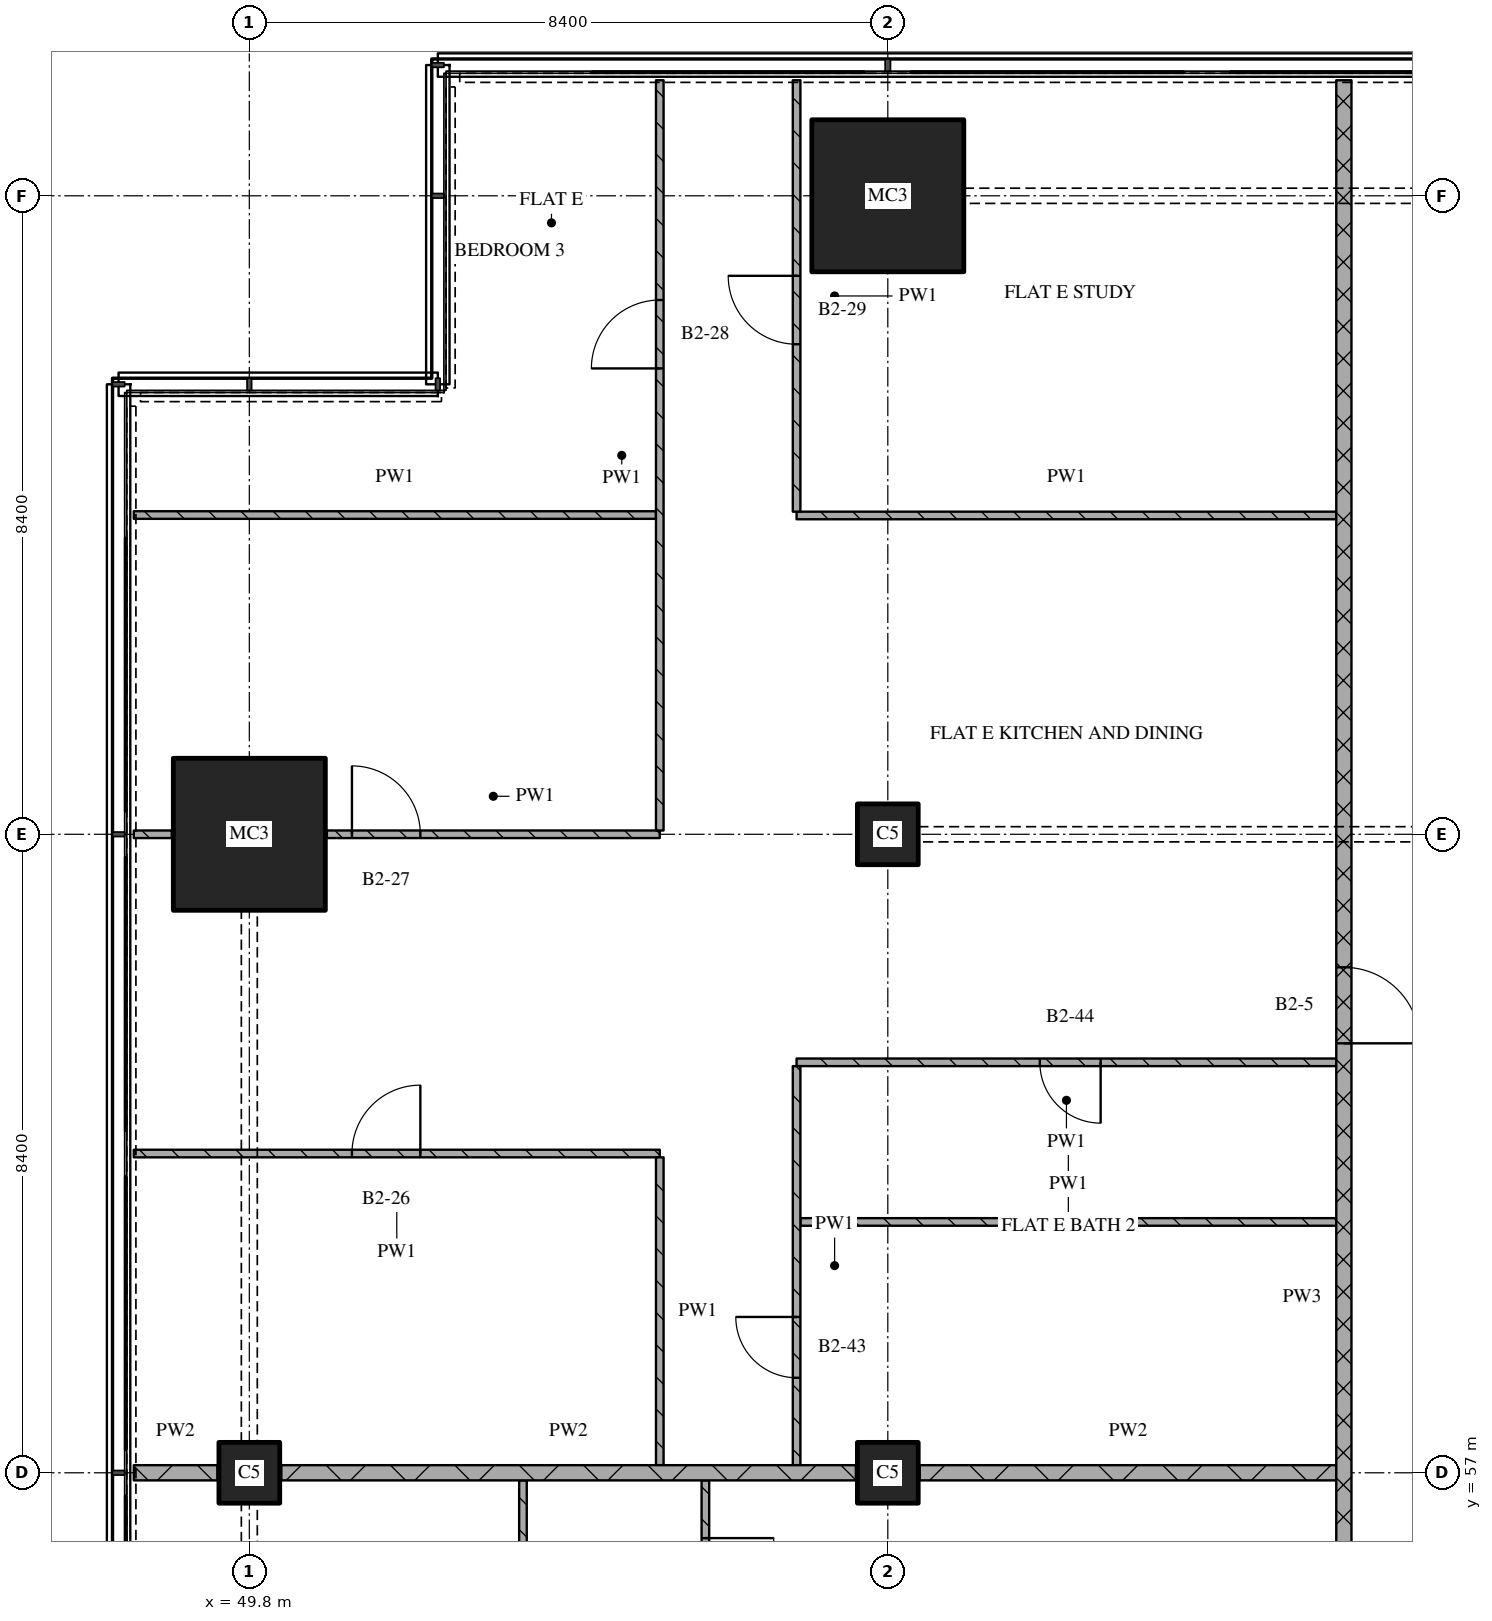
"""IFC4 building model, lengths in metres.
Left out: names, types, materials, properties, quantities, classifications, styles, units other than length and angle.
Written with IfcOpenShell. Run it as: python <this file> out.ifc"""

import sys

from ifc_helpers import new_model, si_unit, direction, frame, frame_2d, origin, origin_2d, place, context, subcontext, project, spatial, rectangle, extrude, element, fill, save


model = new_model("IFC4")
c1 = context("Model", 3, precision=1e-05, world=origin(), true_north=direction((0.0, 1.0)))
c2 = subcontext(c1, "Body", "Model", "MODEL_VIEW")
j1 = project(units=[si_unit("LENGTHUNIT", "METRE"), si_unit("PLANEANGLEUNIT", "RADIAN")], contexts=[c1])
p1 = place(None, origin())
s1 = spatial("IfcSite", under=j1, at=p1, CompositionType="ELEMENT")
p2 = place(p1, origin())
s2 = spatial("IfcBuilding", under=s1, at=p2, CompositionType="ELEMENT")
p3 = place(p2, frame((0.0, 0.0, 109.65)))
s3 = spatial("IfcBuildingStorey", under=s2, at=p3, CompositionType="ELEMENT", Elevation=109.65)
p4 = place(p3, frame((49.8, 57.0, 0.0), z_axis=(0.0, 0.0, 1.0), x_axis=(1.0, 0.0, 0.0)))
e1 = element("IfcColumn", 1, at=p4, inside=s3, PredefinedType="COLUMN", context=c2, shape_type="SweptSolid", body=[
    extrude(rectangle(XDim=0.8, YDim=0.8, at=origin_2d()), origin(), (0.0, 0.0, 1.0), 3.6),
])
p5 = place(p3, frame((49.8, 65.4, 0.0), z_axis=(0.0, 0.0, 1.0), x_axis=(1.0, 0.0, 0.0)))
e2 = element("IfcColumn", 2, at=p5, inside=s3, PredefinedType="COLUMN", context=c2, shape_type="SweptSolid", body=[
    extrude(rectangle(XDim=2.0, YDim=2.0, at=origin_2d()), origin(), (0.0, 0.0, 1.0), 3.6),
])
for number, where, z_axis, x_axis in (
    (3, (58.2, 57.0, 0.0), (0.0, 0.0, 1.0), (1.0, 0.0, 0.0)),
    (4, (58.2, 65.4, 0.0), (0.0, 0.0, 1.0), (1.0, 0.0, 0.0)),
):
    element("IfcColumn", number, at=place(p3, frame(where, z_axis=z_axis, x_axis=x_axis)), inside=s3, PredefinedType="COLUMN", context=c2, shape_type="SweptSolid", body=[
        extrude(rectangle(XDim=0.8, YDim=0.8, at=origin_2d()), origin(), (0.0, 0.0, 1.0), 3.6),
    ])
p6 = place(p3, frame((58.2, 73.8, 0.0), z_axis=(0.0, 0.0, 1.0), x_axis=(1.0, 0.0, 0.0)))
e5 = element("IfcColumn", 5, at=p6, inside=s3, PredefinedType="COLUMN", context=c2, shape_type="SweptSolid", body=[
    extrude(rectangle(XDim=2.0, YDim=2.0, at=origin_2d()), origin(), (0.0, 0.0, 1.0), 3.6),
])
p7 = place(p3, frame((48.28, 57.0, 0.0), z_axis=(0.0, 0.0, 1.0), x_axis=(1.0, 0.0, 0.0)))
e6 = element("IfcWall", 6, at=p7, inside=s3, PredefinedType="PARTITIONING", context=c2, shape_type="SweptSolid", body=[
    extrude(rectangle(XDim=1.1, YDim=0.2, at=frame_2d((0.55, 0.0))), origin(), (0.0, 0.0, 1.0), 3.32),
])
p8 = place(p3, frame((50.22, 57.0, 0.0), z_axis=(0.0, 0.0, 1.0), x_axis=(1.0, 0.0, 0.0)))
e7 = element("IfcWall", 7, at=p8, inside=s3, PredefinedType="PARTITIONING", context=c2, shape_type="SweptSolid", body=[
    extrude(rectangle(XDim=7.56, YDim=0.2, at=frame_2d((3.78, 0.0))), origin(), (0.0, 0.0, 1.0), 3.32),
])
p9 = place(p3, frame((58.62, 57.0, 0.0), z_axis=(0.0, 0.0, 1.0), x_axis=(1.0, 0.0, 0.0)))
e8 = element("IfcWall", 8, at=p9, inside=s3, PredefinedType="PARTITIONING", context=c2, shape_type="SweptSolid", body=[
    extrude(rectangle(XDim=5.48, YDim=0.2, at=frame_2d((2.74, 0.0))), origin(), (0.0, 0.0, 1.0), 3.32),
])
p10 = place(p3, frame((57.05, 60.3, 0.0), z_axis=(0.0, 0.0, 1.0), x_axis=(1.0, 0.0, 0.0)))
e9 = element("IfcWall", 9, at=p10, inside=s3, PredefinedType="PARTITIONING", context=c2, shape_type="SweptSolid", body=[
    extrude(rectangle(XDim=7.05, YDim=0.1, at=frame_2d((3.525, 0.0))), origin(), (0.0, 0.0, 1.0), 3.32),
])
p11 = place(p3, frame((55.2, 61.2, 0.0), z_axis=(0.0, 0.0, 1.0), x_axis=(-1.0, 0.0, 0.0)))
e10 = element("IfcWall", 10, at=p11, inside=s3, PredefinedType="PARTITIONING", context=c2, shape_type="SweptSolid", body=[
    extrude(rectangle(XDim=6.92, YDim=0.1, at=frame_2d((3.46, 0.0))), origin(), (0.0, 0.0, 1.0), 3.32),
])
p12 = place(p11, frame((3.15, 0.0, 0.0)))
e11 = element("IfcOpeningElement", 11, at=p12, cuts=e10, PredefinedType="OPENING", context=c2, shape_type="SweptSolid", body=[
    extrude(rectangle(XDim=0.9, YDim=2.1, at=frame_2d((0.45, 1.05))), frame((0.0, 0.06, 0.0), z_axis=(0.0, -1.0, 0.0), x_axis=(1.0, 0.0, 0.0)), (0.0, 0.0, 1.0), 0.12),
])
p13 = place(p3, frame((64.1, 62.4, 0.0), z_axis=(0.0, 0.0, 1.0), x_axis=(-1.0, 0.0, 0.0)))
e12 = element("IfcWall", 12, at=p13, inside=s3, PredefinedType="PARTITIONING", context=c2, shape_type="SweptSolid", body=[
    extrude(rectangle(XDim=7.1, YDim=0.1, at=frame_2d((3.55, 0.0))), origin(), (0.0, 0.0, 1.0), 3.32),
])
p14 = place(p13, frame((3.1, 0.0, 0.0)))
e13 = element("IfcOpeningElement", 13, at=p14, cuts=e12, PredefinedType="OPENING", context=c2, shape_type="SweptSolid", body=[
    extrude(rectangle(XDim=0.8, YDim=2.1, at=frame_2d((0.4, 1.05))), frame((0.0, 0.06, 0.0), z_axis=(0.0, -1.0, 0.0), x_axis=(1.0, 0.0, 0.0)), (0.0, 0.0, 1.0), 0.12),
])
p15 = place(p3, frame((48.28, 65.4, 0.0), z_axis=(0.0, 0.0, 1.0), x_axis=(1.0, 0.0, 0.0)))
e14 = element("IfcWall", 14, at=p15, inside=s3, PredefinedType="PARTITIONING", context=c2, shape_type="SweptSolid", body=[
    extrude(rectangle(XDim=0.5, YDim=0.1, at=frame_2d((0.25, 0.0))), origin(), (0.0, 0.0, 1.0), 3.32),
])
p16 = place(p3, frame((50.82, 65.4, 0.0), z_axis=(0.0, 0.0, 1.0), x_axis=(1.0, 0.0, 0.0)))
e15 = element("IfcWall", 15, at=p16, inside=s3, PredefinedType="PARTITIONING", context=c2, shape_type="SweptSolid", body=[
    extrude(rectangle(XDim=4.38, YDim=0.1, at=frame_2d((2.19, 0.0))), origin(), (0.0, 0.0, 1.0), 3.32),
])
p17 = place(p16, frame((0.33, 0.0, 0.0)))
e16 = element("IfcOpeningElement", 16, at=p17, cuts=e15, PredefinedType="OPENING", context=c2, shape_type="SweptSolid", body=[
    extrude(rectangle(XDim=0.9, YDim=2.1, at=frame_2d((0.45, 1.05))), frame((0.0, 0.06, 0.0), z_axis=(0.0, -1.0, 0.0), x_axis=(1.0, 0.0, 0.0)), (0.0, 0.0, 1.0), 0.12),
])
p18 = place(p3, frame((57.0, 69.594, 0.0), z_axis=(0.0, 0.0, 1.0), x_axis=(1.0, 0.0, 0.0)))
e17 = element("IfcWall", 17, at=p18, inside=s3, PredefinedType="PARTITIONING", context=c2, shape_type="SweptSolid", body=[
    extrude(rectangle(XDim=7.1, YDim=0.1, at=frame_2d((3.55, 0.0))), origin(), (0.0, 0.0, 1.0), 3.32),
])
p19 = place(p3, frame((48.28, 69.6, 0.0), z_axis=(0.0, 0.0, 1.0), x_axis=(1.0, 0.0, 0.0)))
e18 = element("IfcWall", 18, at=p19, inside=s3, PredefinedType="PARTITIONING", context=c2, shape_type="SweptSolid", body=[
    extrude(rectangle(XDim=6.87, YDim=0.1, at=frame_2d((3.435, 0.0))), origin(), (0.0, 0.0, 1.0), 3.32),
])
p20 = place(p3, frame((53.4, 56.9, 0.0), z_axis=(0.0, 0.0, 1.0), x_axis=(0.0, -1.0, 0.0)))
e19 = element("IfcWall", 19, at=p20, inside=s3, PredefinedType="PARTITIONING", context=c2, shape_type="SweptSolid", body=[
    extrude(rectangle(XDim=8.25, YDim=0.1, at=frame_2d((4.125, 0.0))), origin(), (0.0, 0.0, 1.0), 3.32),
])
p21 = place(p3, frame((55.2, 61.15, 0.0), z_axis=(0.0, 0.0, 1.0), x_axis=(0.0, -1.0, 0.0)))
e20 = element("IfcWall", 20, at=p21, inside=s3, PredefinedType="PARTITIONING", context=c2, shape_type="SweptSolid", body=[
    extrude(rectangle(XDim=4.05, YDim=0.1, at=frame_2d((2.025, 0.0))), origin(), (0.0, 0.0, 1.0), 3.32),
])
p22 = place(p3, frame((55.2, 65.45, 0.0), z_axis=(0.0, 0.0, 1.0), x_axis=(0.0, 1.0, 0.0)))
e21 = element("IfcWall", 21, at=p22, inside=s3, PredefinedType="PARTITIONING", context=c2, shape_type="SweptSolid", body=[
    extrude(rectangle(XDim=9.87, YDim=0.1, at=frame_2d((4.935, 0.0))), origin(), (0.0, 0.0, 1.0), 3.32),
])
p23 = place(p22, frame((6.079, 0.0, 0.0)))
e22 = element("IfcOpeningElement", 22, at=p23, cuts=e21, PredefinedType="OPENING", context=c2, shape_type="SweptSolid", body=[
    extrude(rectangle(XDim=0.9, YDim=2.1, at=frame_2d((0.45, 1.05))), frame((0.0, 0.06, 0.0), z_axis=(0.0, -1.0, 0.0), x_axis=(1.0, 0.0, 0.0)), (0.0, 0.0, 1.0), 0.12),
])
p24 = place(p3, frame((55.8, 56.9, 0.0), z_axis=(0.0, 0.0, 1.0), x_axis=(0.0, -1.0, 0.0)))
e23 = element("IfcWall", 23, at=p24, inside=s3, PredefinedType="PARTITIONING", context=c2, shape_type="SweptSolid", body=[
    extrude(rectangle(XDim=2.469, YDim=0.1, at=frame_2d((1.234, 0.0))), origin(), (0.0, 0.0, 1.0), 3.32),
])
p25 = place(p24, frame((0.76, 0.0, 0.0)))
e24 = element("IfcOpeningElement", 24, at=p25, cuts=e23, PredefinedType="OPENING", context=c2, shape_type="SweptSolid", body=[
    extrude(rectangle(XDim=0.9, YDim=2.1, at=frame_2d((0.45, 1.05))), frame((0.0, 0.06, 0.0), z_axis=(0.0, -1.0, 0.0), x_axis=(1.0, 0.0, 0.0)), (0.0, 0.0, 1.0), 0.12),
])
p26 = place(p3, frame((57.0, 62.35, 0.0), z_axis=(0.0, 0.0, 1.0), x_axis=(0.0, -1.0, 0.0)))
e25 = element("IfcWall", 25, at=p26, inside=s3, PredefinedType="PARTITIONING", context=c2, shape_type="SweptSolid", body=[
    extrude(rectangle(XDim=5.25, YDim=0.1, at=frame_2d((2.625, 0.0))), origin(), (0.0, 0.0, 1.0), 3.32),
])
p27 = place(p26, frame((3.3, 0.0, 0.0)))
e26 = element("IfcOpeningElement", 26, at=p27, cuts=e25, PredefinedType="OPENING", context=c2, shape_type="SweptSolid", body=[
    extrude(rectangle(XDim=0.8, YDim=2.1, at=frame_2d((0.4, 1.05))), frame((0.0, 0.06, 0.0), z_axis=(0.0, -1.0, 0.0), x_axis=(1.0, 0.0, 0.0)), (0.0, 0.0, 1.0), 0.12),
])
p28 = place(p3, frame((57.0, 75.32, 0.0), z_axis=(0.0, 0.0, 1.0), x_axis=(0.0, -1.0, 0.0)))
e27 = element("IfcWall", 27, at=p28, inside=s3, PredefinedType="PARTITIONING", context=c2, shape_type="SweptSolid", body=[
    extrude(rectangle(XDim=5.676, YDim=0.1, at=frame_2d((2.838, 0.0))), origin(), (0.0, 0.0, 1.0), 3.32),
])
p29 = place(p28, frame((2.573, 0.0, 0.0)))
e28 = element("IfcOpeningElement", 28, at=p29, cuts=e27, PredefinedType="OPENING", context=c2, shape_type="SweptSolid", body=[
    extrude(rectangle(XDim=0.9, YDim=2.1, at=frame_2d((0.45, 1.05))), frame((0.0, 0.06, 0.0), z_axis=(0.0, -1.0, 0.0), x_axis=(1.0, 0.0, 0.0)), (0.0, 0.0, 1.0), 0.12),
])
p30 = place(p3, frame((64.2, 43.3, 0.0), z_axis=(0.0, 0.0, 1.0), x_axis=(0.0, 1.0, 0.0)))
e29 = element("IfcWall", 29, at=p30, inside=s3, PredefinedType="PARTITIONING", context=c2, shape_type="SweptSolid", body=[
    extrude(rectangle(XDim=32.02, YDim=0.2, at=frame_2d((16.01, 0.0))), origin(), (0.0, 0.0, 1.0), 3.32),
])
p31 = place(p30, frame((4.95, 0.0, 0.0)))
e30 = element("IfcOpeningElement", 30, at=p31, cuts=e29, PredefinedType="OPENING", context=c2, shape_type="SweptSolid", body=[
    extrude(rectangle(XDim=1.0, YDim=2.1, at=frame_2d((0.5, 1.05))), frame((0.0, 0.11, 0.0), z_axis=(0.0, -1.0, 0.0), x_axis=(1.0, 0.0, 0.0)), (0.0, 0.0, 1.0), 0.22),
])
p32 = place(p30, frame((19.35, 0.0, 0.0)))
e31 = element("IfcOpeningElement", 31, at=p32, cuts=e29, PredefinedType="OPENING", context=c2, shape_type="SweptSolid", body=[
    extrude(rectangle(XDim=1.0, YDim=2.1, at=frame_2d((0.5, 1.05))), frame((0.0, 0.11, 0.0), z_axis=(0.0, -1.0, 0.0), x_axis=(1.0, 0.0, 0.0)), (0.0, 0.0, 1.0), 0.22),
])
p33 = place(p12, origin())
e32 = element("IfcDoor", 32, at=p33, inside=s3, OperationType="SINGLE_SWING_RIGHT", PredefinedType="DOOR", context=c2, shape_type="SweptSolid", body=[
    extrude(rectangle(XDim=0.9, YDim=2.1, at=frame_2d((0.45, 1.05))), frame((0.0, 0.025, 0.0), z_axis=(0.0, -1.0, 0.0), x_axis=(1.0, 0.0, 0.0)), (0.0, 0.0, 1.0), 0.05),
])
fill(e11, e32)
p34 = place(p14, origin())
e33 = element("IfcDoor", 33, at=p34, inside=s3, OperationType="SINGLE_SWING_LEFT", PredefinedType="DOOR", context=c2, shape_type="SweptSolid", body=[
    extrude(rectangle(XDim=0.8, YDim=2.1, at=frame_2d((0.4, 1.05))), frame((0.0, 0.025, 0.0), z_axis=(0.0, -1.0, 0.0), x_axis=(1.0, 0.0, 0.0)), (0.0, 0.0, 1.0), 0.05),
])
fill(e13, e33)
p35 = place(p17, origin())
e34 = element("IfcDoor", 34, at=p35, inside=s3, OperationType="SINGLE_SWING_LEFT", PredefinedType="DOOR", context=c2, shape_type="SweptSolid", body=[
    extrude(rectangle(XDim=0.9, YDim=2.1, at=frame_2d((0.45, 1.05))), frame((0.0, 0.025, 0.0), z_axis=(0.0, -1.0, 0.0), x_axis=(1.0, 0.0, 0.0)), (0.0, 0.0, 1.0), 0.05),
])
fill(e16, e34)
p36 = place(p23, origin())
e35 = element("IfcDoor", 35, at=p36, inside=s3, OperationType="SINGLE_SWING_LEFT", PredefinedType="DOOR", context=c2, shape_type="SweptSolid", body=[
    extrude(rectangle(XDim=0.9, YDim=2.1, at=frame_2d((0.45, 1.05))), frame((0.0, 0.025, 0.0), z_axis=(0.0, -1.0, 0.0), x_axis=(1.0, 0.0, 0.0)), (0.0, 0.0, 1.0), 0.05),
])
fill(e22, e35)
p37 = place(p25, origin())
e36 = element("IfcDoor", 36, at=p37, inside=s3, OperationType="SINGLE_SWING_LEFT", PredefinedType="DOOR", context=c2, shape_type="SweptSolid", body=[
    extrude(rectangle(XDim=0.9, YDim=2.1, at=frame_2d((0.45, 1.05))), frame((0.0, 0.025, 0.0), z_axis=(0.0, -1.0, 0.0), x_axis=(1.0, 0.0, 0.0)), (0.0, 0.0, 1.0), 0.05),
])
fill(e24, e36)
p38 = place(p27, origin())
e37 = element("IfcDoor", 37, at=p38, inside=s3, OperationType="SINGLE_SWING_RIGHT", PredefinedType="DOOR", context=c2, shape_type="SweptSolid", body=[
    extrude(rectangle(XDim=0.8, YDim=2.1, at=frame_2d((0.4, 1.05))), frame((0.0, 0.025, 0.0), z_axis=(0.0, -1.0, 0.0), x_axis=(1.0, 0.0, 0.0)), (0.0, 0.0, 1.0), 0.05),
])
fill(e26, e37)
p39 = place(p29, origin())
e38 = element("IfcDoor", 38, at=p39, inside=s3, OperationType="SINGLE_SWING_RIGHT", PredefinedType="DOOR", context=c2, shape_type="SweptSolid", body=[
    extrude(rectangle(XDim=0.9, YDim=2.1, at=frame_2d((0.45, 1.05))), frame((0.0, 0.025, 0.0), z_axis=(0.0, -1.0, 0.0), x_axis=(1.0, 0.0, 0.0)), (0.0, 0.0, 1.0), 0.05),
])
fill(e28, e38)
p40 = place(p32, origin())
e39 = element("IfcDoor", 39, at=p40, inside=s3, OperationType="SINGLE_SWING_RIGHT", PredefinedType="DOOR", context=c2, shape_type="SweptSolid", body=[
    extrude(rectangle(XDim=1.0, YDim=2.1, at=frame_2d((0.5, 1.05))), frame((0.0, 0.025, 0.0), z_axis=(0.0, -1.0, 0.0), x_axis=(1.0, 0.0, 0.0)), (0.0, 0.0, 1.0), 0.05),
])
fill(e31, e39)
save(model, sys.argv[1])
